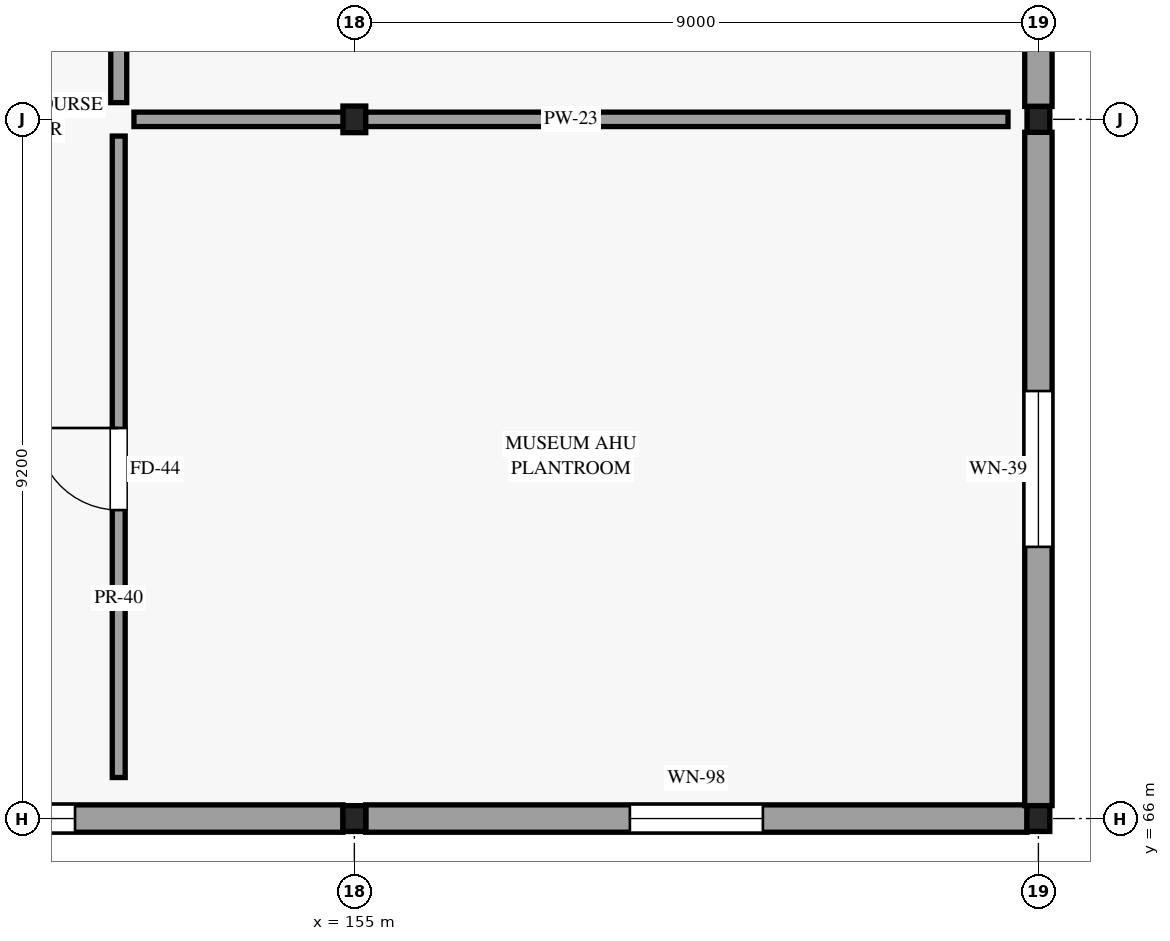
"""IFC4 building model, lengths in metres.
Left out: names, types, materials, properties, quantities, classifications, styles, units other than length and angle.
Written with IfcOpenShell. Run it as: python <this file> out.ifc"""

import sys

from ifc_helpers import new_model, si_unit, direction, frame, frame_2d, origin, origin_2d, place, context, subcontext, project, spatial, rectangle, i_section, extrude, element, fill, save


model = new_model("IFC4")
c1 = context("Model", 3, precision=1e-05, world=origin(), true_north=direction((0.0, 1.0)))
c2 = subcontext(c1, "Body", "Model", "MODEL_VIEW")
j1 = project(units=[si_unit("LENGTHUNIT", "METRE"), si_unit("PLANEANGLEUNIT", "RADIAN")], contexts=[c1])
p1 = place(None, origin())
s1 = spatial("IfcSite", under=j1, at=p1, CompositionType="ELEMENT")
p2 = place(p1, origin())
s2 = spatial("IfcBuilding", under=s1, at=p2, CompositionType="ELEMENT")
p3 = place(p2, frame((0.0, 0.0, 19.5)))
s3 = spatial("IfcBuildingStorey", under=s2, at=p3, CompositionType="ELEMENT", Elevation=19.5)
p4 = place(p3, frame((155.0, 66.0, 0.0), z_axis=(0.0, 0.0, 1.0), x_axis=(1.0, 0.0, 0.0)))
e1 = element("IfcColumn", 1, at=p4, inside=s3, PredefinedType="COLUMN", context=c2, shape_type="SweptSolid", body=[
    extrude(i_section(OverallWidth=0.3, OverallDepth=0.34, WebThickness=0.012, FlangeThickness=0.021, FilletRadius=0.027, at=origin_2d()), origin(), (0.0, 0.0, 1.0), 4.5),
])
p5 = place(p3, frame((155.0, 75.2, 0.0), z_axis=(0.0, 0.0, 1.0), x_axis=(1.0, 0.0, 0.0)))
e2 = element("IfcColumn", 2, at=p5, inside=s3, PredefinedType="COLUMN", context=c2, shape_type="SweptSolid", body=[
    extrude(i_section(OverallWidth=0.3, OverallDepth=0.35, WebThickness=0.01, FlangeThickness=0.018, FilletRadius=0.027, at=origin_2d()), origin(), (0.0, 0.0, 1.0), 4.5),
])
for number, where, z_axis, x_axis in (
    (3, (164.0, 66.0, 0.0), (0.0, 0.0, 1.0), (1.0, 0.0, 0.0)),
    (4, (164.0, 75.2, 0.0), (0.0, 0.0, 1.0), (1.0, 0.0, 0.0)),
):
    element("IfcColumn", number, at=place(p3, frame(where, z_axis=z_axis, x_axis=x_axis)), inside=s3, PredefinedType="COLUMN", context=c2, shape_type="SweptSolid", body=[
        extrude(i_section(OverallWidth=0.3, OverallDepth=0.34, WebThickness=0.012, FlangeThickness=0.021, FilletRadius=0.027, at=origin_2d()), origin(), (0.0, 0.0, 1.0), 4.5),
    ])
p6 = place(p3, frame((146.15, 66.0, 0.0), z_axis=(0.0, 0.0, 1.0), x_axis=(1.0, 0.0, 0.0)))
e5 = element("IfcWall", 5, at=p6, inside=s3, PredefinedType="STANDARD", context=c2, shape_type="SweptSolid", body=[
    extrude(rectangle(XDim=8.7, YDim=0.36, at=frame_2d((4.35, 0.0))), origin(), (0.0, 0.0, 1.0), 3.825),
])
p7 = place(p6, frame((5.175, 0.0, 0.85), z_axis=(0.0, 0.0, 1.0), x_axis=(-1.0, 0.0, 0.0)))
e6 = element("IfcOpeningElement", 6, at=p7, cuts=e5, PredefinedType="OPENING", context=c2, shape_type="SweptSolid", body=[
    extrude(rectangle(XDim=1.65, YDim=2.0, at=frame_2d((0.825, 1.0))), frame((0.0, 0.19, 0.0), z_axis=(0.0, -1.0, 0.0), x_axis=(1.0, 0.0, 0.0)), (0.0, 0.0, 1.0), 0.38),
])
p8 = place(p3, frame((155.15, 66.0, 0.0), z_axis=(0.0, 0.0, 1.0), x_axis=(1.0, 0.0, 0.0)))
e7 = element("IfcWall", 7, at=p8, inside=s3, PredefinedType="STANDARD", context=c2, shape_type="SweptSolid", body=[
    extrude(rectangle(XDim=8.7, YDim=0.36, at=frame_2d((4.35, 0.0))), origin(), (0.0, 0.0, 1.0), 3.825),
])
p9 = place(p8, frame((5.225, 0.0, 0.85), z_axis=(0.0, 0.0, 1.0), x_axis=(-1.0, 0.0, 0.0)))
e8 = element("IfcOpeningElement", 8, at=p9, cuts=e7, PredefinedType="OPENING", context=c2, shape_type="SweptSolid", body=[
    extrude(rectangle(XDim=1.75, YDim=2.05, at=frame_2d((0.875, 1.025))), frame((0.0, 0.19, 0.0), z_axis=(0.0, -1.0, 0.0), x_axis=(1.0, 0.0, 0.0)), (0.0, 0.0, 1.0), 0.38),
])
p10 = place(p3, frame((164.0, 66.17, 0.0), z_axis=(0.0, 0.0, 1.0), x_axis=(0.0, 1.0, 0.0)))
e9 = element("IfcWall", 9, at=p10, inside=s3, PredefinedType="STANDARD", context=c2, shape_type="SweptSolid", body=[
    extrude(rectangle(XDim=8.86, YDim=0.36, at=frame_2d((4.43, 0.0))), origin(), (0.0, 0.0, 1.0), 3.825),
])
p11 = place(p10, frame((5.455, 0.0, 0.85), z_axis=(0.0, 0.0, 1.0), x_axis=(-1.0, 0.0, 0.0)))
e10 = element("IfcOpeningElement", 10, at=p11, cuts=e9, PredefinedType="OPENING", context=c2, shape_type="SweptSolid", body=[
    extrude(rectangle(XDim=2.05, YDim=2.2, at=frame_2d((1.025, 1.1))), frame((0.0, 0.19, 0.0), z_axis=(0.0, -1.0, 0.0), x_axis=(1.0, 0.0, 0.0)), (0.0, 0.0, 1.0), 0.38),
])
p12 = place(p3, frame((164.0, 75.37, 0.0), z_axis=(0.0, 0.0, 1.0), x_axis=(0.0, 1.0, 0.0)))
e11 = element("IfcWall", 11, at=p12, inside=s3, PredefinedType="STANDARD", context=c2, shape_type="SweptSolid", body=[
    extrude(rectangle(XDim=8.86, YDim=0.36, at=frame_2d((4.43, 0.0))), origin(), (0.0, 0.0, 1.0), 3.825),
])
p13 = place(p12, frame((5.555, 0.0, 0.85), z_axis=(0.0, 0.0, 1.0), x_axis=(-1.0, 0.0, 0.0)))
e12 = element("IfcOpeningElement", 12, at=p13, cuts=e11, PredefinedType="OPENING", context=c2, shape_type="SweptSolid", body=[
    extrude(rectangle(XDim=2.25, YDim=2.3, at=frame_2d((1.125, 1.15))), frame((0.0, 0.19, 0.0), z_axis=(0.0, -1.0, 0.0), x_axis=(1.0, 0.0, 0.0)), (0.0, 0.0, 1.0), 0.38),
])
p14 = place(p3, frame((151.9, 66.54, 0.0), z_axis=(0.0, 0.0, 1.0), x_axis=(0.0, 1.0, 0.0)))
e13 = element("IfcWall", 13, at=p14, inside=s3, PredefinedType="PARTITIONING", context=c2, shape_type="SweptSolid", body=[
    extrude(rectangle(XDim=8.44, YDim=0.17, at=frame_2d((4.22, 0.0))), origin(), (0.0, 0.0, 1.0), 3.825),
])
p15 = place(p14, frame((3.519, 0.0, 0.0)))
e14 = element("IfcOpeningElement", 14, at=p15, cuts=e13, PredefinedType="OPENING", context=c2, shape_type="SweptSolid", body=[
    extrude(rectangle(XDim=1.08, YDim=2.24, at=frame_2d((0.54, 1.12))), frame((0.0, 0.095, 0.0), z_axis=(0.0, -1.0, 0.0), x_axis=(1.0, 0.0, 0.0)), (0.0, 0.0, 1.0), 0.19),
])
p16 = place(p3, frame((152.1, 75.2, 0.0), z_axis=(0.0, 0.0, 1.0), x_axis=(1.0, 0.0, 0.0)))
e15 = element("IfcWall", 15, at=p16, inside=s3, PredefinedType="PARTITIONING", context=c2, shape_type="SweptSolid", body=[
    extrude(rectangle(XDim=11.5, YDim=0.19, at=frame_2d((5.75, 0.0))), origin(), (0.0, 0.0, 1.0), 3.825),
])
p17 = place(p3, frame((151.9, 75.42, 0.0), z_axis=(0.0, 0.0, 1.0), x_axis=(0.0, 1.0, 0.0)))
e16 = element("IfcWall", 16, at=p17, inside=s3, PredefinedType="PARTITIONING", context=c2, shape_type="SweptSolid", body=[
    extrude(rectangle(XDim=8.76, YDim=0.21, at=frame_2d((4.38, 0.0))), origin(), (0.0, 0.0, 1.0), 3.825),
])
p18 = place(p17, frame((3.88, 0.0, 0.0)))
e17 = element("IfcOpeningElement", 17, at=p18, cuts=e16, PredefinedType="OPENING", context=c2, shape_type="SweptSolid", body=[
    extrude(rectangle(XDim=1.16, YDim=2.28, at=frame_2d((0.58, 1.14))), frame((0.0, 0.115, 0.0), z_axis=(0.0, -1.0, 0.0), x_axis=(1.0, 0.0, 0.0)), (0.0, 0.0, 1.0), 0.23),
])
p19 = place(p7, origin())
e18 = element("IfcWindow", 18, at=p19, inside=s3, PartitioningType="SINGLE_PANEL", PredefinedType="WINDOW", context=c2, shape_type="SweptSolid", body=[
    extrude(rectangle(XDim=1.65, YDim=2.0, at=frame_2d((0.825, 1.0))), frame((0.0, 0.03, 0.0), z_axis=(0.0, -1.0, 0.0), x_axis=(1.0, 0.0, 0.0)), (0.0, 0.0, 1.0), 0.06),
])
fill(e6, e18)
p20 = place(p9, origin())
e19 = element("IfcWindow", 19, at=p20, inside=s3, PartitioningType="SINGLE_PANEL", PredefinedType="WINDOW", context=c2, shape_type="SweptSolid", body=[
    extrude(rectangle(XDim=1.75, YDim=2.05, at=frame_2d((0.875, 1.025))), frame((0.0, 0.03, 0.0), z_axis=(0.0, -1.0, 0.0), x_axis=(1.0, 0.0, 0.0)), (0.0, 0.0, 1.0), 0.06),
])
fill(e8, e19)
p21 = place(p11, origin())
e20 = element("IfcWindow", 20, at=p21, inside=s3, PartitioningType="SINGLE_PANEL", PredefinedType="WINDOW", context=c2, shape_type="SweptSolid", body=[
    extrude(rectangle(XDim=2.05, YDim=2.2, at=frame_2d((1.025, 1.1))), frame((0.0, 0.03, 0.0), z_axis=(0.0, -1.0, 0.0), x_axis=(1.0, 0.0, 0.0)), (0.0, 0.0, 1.0), 0.06),
])
fill(e10, e20)
p22 = place(p15, origin())
e21 = element("IfcDoor", 21, at=p22, inside=s3, OperationType="SINGLE_SWING_RIGHT", PredefinedType="DOOR", context=c2, shape_type="SweptSolid", body=[
    extrude(rectangle(XDim=1.08, YDim=2.24, at=frame_2d((0.54, 1.12))), frame((0.0, 0.025, 0.0), z_axis=(0.0, -1.0, 0.0), x_axis=(1.0, 0.0, 0.0)), (0.0, 0.0, 1.0), 0.05),
])
fill(e14, e21)
save(model, sys.argv[1])
